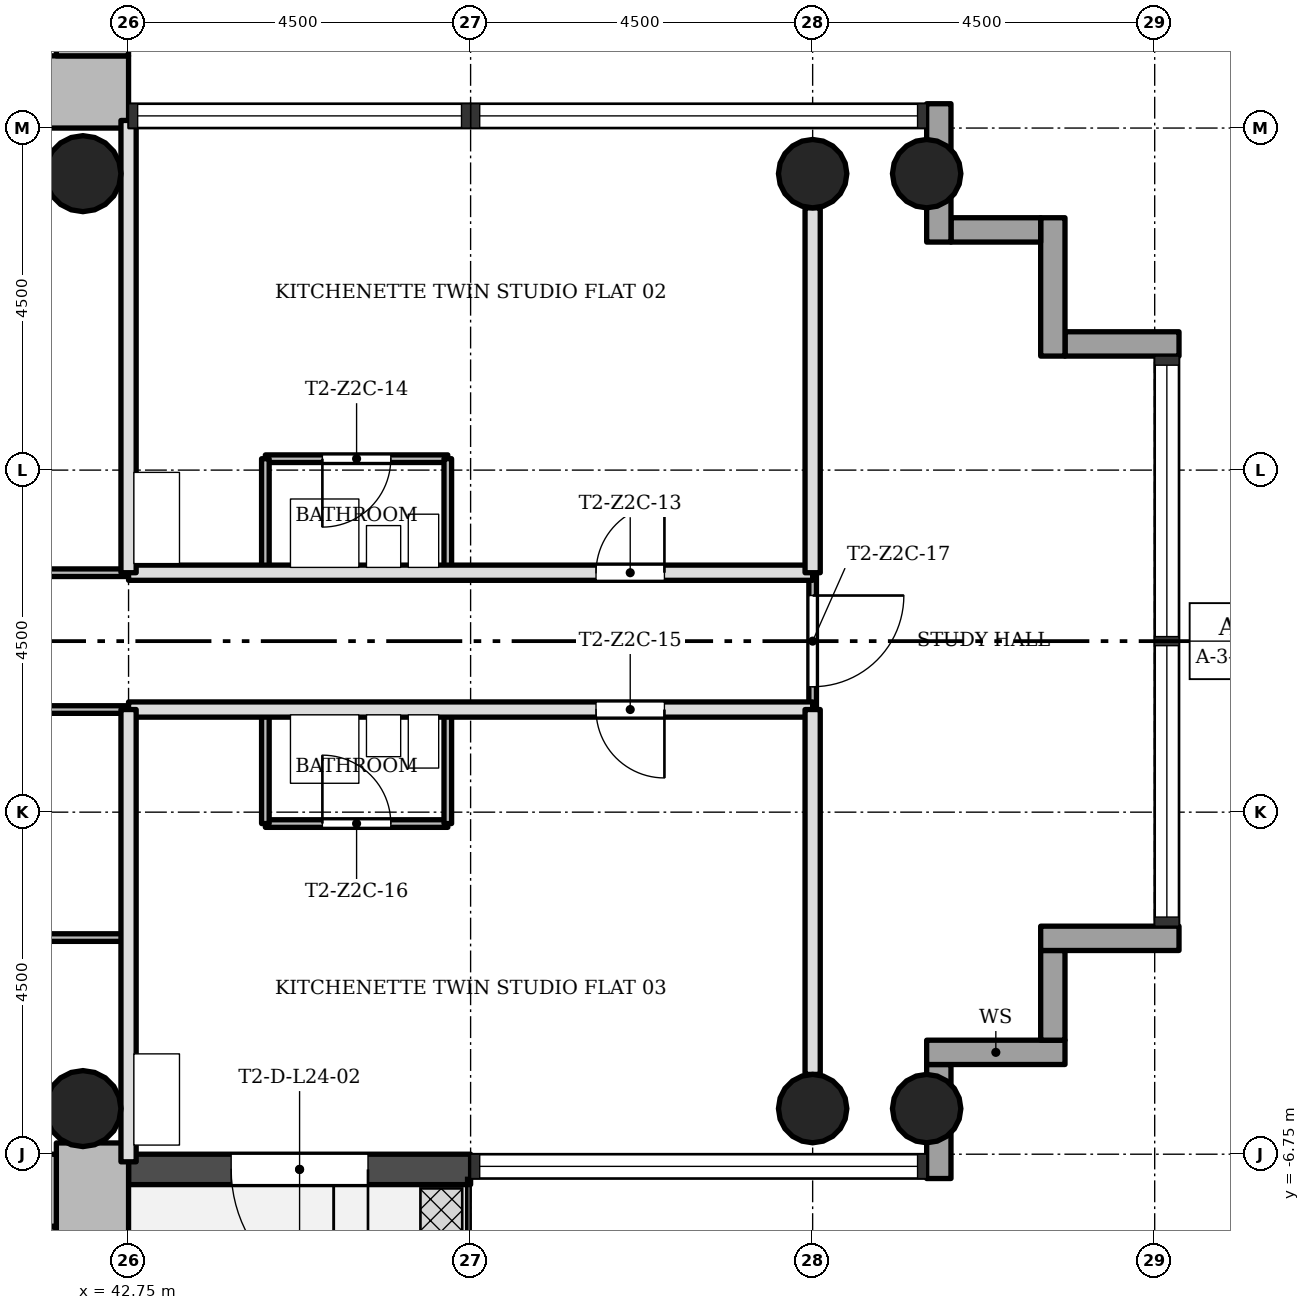
"""IFC4 building model, lengths in metres.
Left out: names, types, materials, properties, quantities, classifications, styles, units other than length and angle.
Written with IfcOpenShell. Run it as: python <this file> out.ifc"""

import sys

from ifc_helpers import new_model, si_unit, direction, frame, frame_2d, origin, origin_2d, place, context, subcontext, project, spatial, rectangle, hollow_circle, extrude, element, fill, save


model = new_model("IFC4")
c1 = context("Model", 3, precision=1e-05, world=origin(), true_north=direction((0.0, 1.0)))
c2 = subcontext(c1, "Body", "Model", "MODEL_VIEW")
j1 = project(units=[si_unit("LENGTHUNIT", "METRE"), si_unit("PLANEANGLEUNIT", "RADIAN")], contexts=[c1])
p1 = place(None, origin())
s1 = spatial("IfcSite", under=j1, at=p1, CompositionType="ELEMENT")
p2 = place(p1, origin())
s2 = spatial("IfcBuilding", under=s1, at=p2, CompositionType="ELEMENT")
p3 = place(p2, frame((0.0, 0.0, 90.2)))
s3 = spatial("IfcBuildingStorey", under=s2, at=p3, CompositionType="ELEMENT", Elevation=90.2)
p4 = place(p3, frame((30.2, 7.225, 0.0), z_axis=(0.0, 0.0, 1.0), x_axis=(1.0, 0.0, 0.0)))
e1 = element("IfcWall", 1, at=p4, inside=s3, PredefinedType="SHEAR", context=c2, shape_type="SweptSolid", body=[
    extrude(rectangle(XDim=12.55, YDim=0.95, at=frame_2d((6.275, 0.0))), origin(), (0.0, 0.0, 1.0), 3.4),
])
p5 = place(p4, frame((4.9, 0.0, 0.0)))
e2 = element("IfcOpeningElement", 2, at=p5, cuts=e1, PredefinedType="OPENING", context=c2, shape_type="SweptSolid", body=[
    extrude(rectangle(XDim=1.8, YDim=2.1, at=frame_2d((0.9, 1.05))), frame((0.0, 0.485, 0.0), z_axis=(0.0, -1.0, 0.0), x_axis=(1.0, 0.0, 0.0)), (0.0, 0.0, 1.0), 0.97),
])
p6 = place(p3, frame((42.275, 7.7, 0.0), z_axis=(0.0, 0.0, 1.0), x_axis=(0.0, 1.0, 0.0)))
e3 = element("IfcWall", 3, at=p6, inside=s3, PredefinedType="SHEAR", context=c2, shape_type="SweptSolid", body=[
    extrude(rectangle(XDim=8.05, YDim=0.95, at=frame_2d((4.025, 0.0))), origin(), (0.0, 0.0, 1.0), 3.4),
])
p7 = place(p3, frame((42.275, -14.8, 0.0), z_axis=(0.0, 0.0, 1.0), x_axis=(0.0, 1.0, 0.0)))
e4 = element("IfcWall", 4, at=p7, inside=s3, PredefinedType="SHEAR", context=c2, shape_type="SweptSolid", body=[
    extrude(rectangle(XDim=8.198, YDim=0.95, at=frame_2d((4.099, 0.0))), origin(), (0.0, 0.0, 1.0), 3.4),
])
p8 = place(p3, frame((41.8, -7.225, 0.0), z_axis=(0.0, 0.0, 1.0), x_axis=(-1.0, 0.0, 0.0)))
e5 = element("IfcWall", 5, at=p8, inside=s3, PredefinedType="SHEAR", context=c2, shape_type="SweptSolid", body=[
    extrude(rectangle(XDim=12.55, YDim=0.95, at=frame_2d((6.275, 0.0))), origin(), (0.0, 0.0, 1.0), 3.4),
])
p9 = place(p8, frame((4.9, 0.0, 0.0)))
e6 = element("IfcOpeningElement", 6, at=p9, cuts=e5, PredefinedType="OPENING", context=c2, shape_type="SweptSolid", body=[
    extrude(rectangle(XDim=1.8, YDim=2.1, at=frame_2d((0.9, 1.05))), frame((0.0, 0.485, 0.0), z_axis=(0.0, -1.0, 0.0), x_axis=(1.0, 0.0, 0.0)), (0.0, 0.0, 1.0), 0.97),
])
for number, where, z_axis, x_axis in (
    (7, (51.75, -6.15, 0.0), (0.0, 0.0, 1.0), (1.0, 0.0, 0.0)),
    (8, (51.75, 6.15, 0.0), (0.0, 0.0, 1.0), (1.0, 0.0, 0.0)),
    (9, (53.25, -6.15, 0.0), (0.0, 0.0, 1.0), (1.0, 0.0, 0.0)),
    (10, (53.25, 6.15, 0.0), (0.0, 0.0, 1.0), (1.0, 0.0, 0.0)),
):
    element("IfcColumn", number, at=place(p3, frame(where, z_axis=z_axis, x_axis=x_axis)), inside=s3, PredefinedType="COLUMN", context=c2, shape_type="SweptSolid", body=[
        extrude(hollow_circle(Radius=0.45, WallThickness=0.032, at=origin_2d()), origin(), (0.0, 0.0, 1.0), 3.4),
    ])
for number, where, z_axis, x_axis in (
    (11, (42.15, -6.15, 0.0), (0.0, 0.0, 1.0), (1.0, 0.0, 0.0)),
    (12, (42.15, 6.15, 0.0), (0.0, 0.0, 1.0), (1.0, 0.0, 0.0)),
):
    element("IfcColumn", number, at=place(p3, frame(where, z_axis=z_axis, x_axis=x_axis)), inside=s3, PredefinedType="COLUMN", context=c2, shape_type="SweptSolid", body=[
        extrude(hollow_circle(Radius=0.5, WallThickness=0.036, at=origin_2d()), origin(), (0.0, 0.0, 1.0), 3.4),
    ])
p10 = place(p3, frame((42.75, -6.95, -0.02), z_axis=(0.0, 0.0, 1.0), x_axis=(1.0, 0.0, 0.0)))
e13 = element("IfcWall", 13, at=p10, inside=s3, PredefinedType="STANDARD", context=c2, shape_type="SweptSolid", body=[
    extrude(rectangle(XDim=4.5, YDim=0.4, at=frame_2d((2.25, 0.0))), origin(), (0.0, 0.0, 1.0), 3.12),
])
p11 = place(p10, frame((1.35, 0.0, 0.02)))
e14 = element("IfcOpeningElement", 14, at=p11, cuts=e13, PredefinedType="OPENING", context=c2, shape_type="SweptSolid", body=[
    extrude(rectangle(XDim=1.8, YDim=2.1, at=frame_2d((0.9, 1.05))), frame((0.0, 0.21, 0.0), z_axis=(0.0, -1.0, 0.0), x_axis=(1.0, 0.0, 0.0)), (0.0, 0.0, 1.0), 0.42),
])
p12 = place(p3, frame((53.41, -7.07, -0.3), z_axis=(0.0, 0.0, 1.0), x_axis=(0.0, 1.0, 0.0)))
e15 = element("IfcWall", 15, at=p12, inside=s3, PredefinedType="STANDARD", context=c2, shape_type="SweptSolid", body=[
    extrude(rectangle(XDim=1.5, YDim=0.32, at=frame_2d((0.75, 0.0))), origin(), (0.0, 0.0, 1.0), 3.4),
])
p13 = place(p3, frame((53.25, -5.41, -0.3), z_axis=(0.0, 0.0, 1.0), x_axis=(1.0, 0.0, 0.0)))
e16 = element("IfcWall", 16, at=p13, inside=s3, PredefinedType="STANDARD", context=c2, shape_type="SweptSolid", body=[
    extrude(rectangle(XDim=1.82, YDim=0.32, at=frame_2d((0.91, 0.0))), origin(), (0.0, 0.0, 1.0), 3.4),
])
p14 = place(p3, frame((54.91, -5.25, -0.3), z_axis=(0.0, 0.0, 1.0), x_axis=(0.0, 1.0, 0.0)))
e17 = element("IfcWall", 17, at=p14, inside=s3, PredefinedType="STANDARD", context=c2, shape_type="SweptSolid", body=[
    extrude(rectangle(XDim=1.18, YDim=0.32, at=frame_2d((0.59, 0.0))), origin(), (0.0, 0.0, 1.0), 3.4),
])
p15 = place(p3, frame((54.75, -3.91, -0.3), z_axis=(0.0, 0.0, 1.0), x_axis=(1.0, 0.0, 0.0)))
e18 = element("IfcWall", 18, at=p15, inside=s3, PredefinedType="STANDARD", context=c2, shape_type="SweptSolid", body=[
    extrude(rectangle(XDim=1.82, YDim=0.32, at=frame_2d((0.91, 0.0))), origin(), (0.0, 0.0, 1.0), 3.4),
])
p16 = place(p3, frame((56.57, 3.91, -0.3), z_axis=(0.0, 0.0, 1.0), x_axis=(-1.0, 0.0, 0.0)))
e19 = element("IfcWall", 19, at=p16, inside=s3, PredefinedType="STANDARD", context=c2, shape_type="SweptSolid", body=[
    extrude(rectangle(XDim=1.5, YDim=0.32, at=frame_2d((0.75, 0.0))), origin(), (0.0, 0.0, 1.0), 3.4),
])
p17 = place(p3, frame((54.91, 3.75, -0.3), z_axis=(0.0, 0.0, 1.0), x_axis=(0.0, 1.0, 0.0)))
e20 = element("IfcWall", 20, at=p17, inside=s3, PredefinedType="STANDARD", context=c2, shape_type="SweptSolid", body=[
    extrude(rectangle(XDim=1.82, YDim=0.32, at=frame_2d((0.91, 0.0))), origin(), (0.0, 0.0, 1.0), 3.4),
])
p18 = place(p3, frame((54.75, 5.41, -0.3), z_axis=(0.0, 0.0, 1.0), x_axis=(-1.0, 0.0, 0.0)))
e21 = element("IfcWall", 21, at=p18, inside=s3, PredefinedType="STANDARD", context=c2, shape_type="SweptSolid", body=[
    extrude(rectangle(XDim=1.18, YDim=0.32, at=frame_2d((0.59, 0.0))), origin(), (0.0, 0.0, 1.0), 3.4),
])
p19 = place(p3, frame((53.41, 5.25, -0.3), z_axis=(0.0, 0.0, 1.0), x_axis=(0.0, 1.0, 0.0)))
e22 = element("IfcWall", 22, at=p19, inside=s3, PredefinedType="STANDARD", context=c2, shape_type="SweptSolid", body=[
    extrude(rectangle(XDim=1.82, YDim=0.32, at=frame_2d((0.91, 0.0))), origin(), (0.0, 0.0, 1.0), 3.4),
])
p20 = place(p3, frame((42.75, -3.9, 0.0), z_axis=(0.0, 0.0, 1.0), x_axis=(-1.0, 0.0, 0.0)))
e23 = element("IfcWall", 23, at=p20, inside=s3, PredefinedType="PARTITIONING", context=c2, shape_type="SweptSolid", body=[
    extrude(rectangle(XDim=5.25, YDim=0.1, at=frame_2d((2.625, 0.0))), origin(), (0.0, 0.0, 1.0), 3.0),
])
p21 = place(p3, frame((46.95, -2.4, 0.0), z_axis=(0.0, 0.0, 1.0), x_axis=(-1.0, 0.0, 0.0)))
e24 = element("IfcWall", 24, at=p21, inside=s3, PredefinedType="PARTITIONING", context=c2, shape_type="SweptSolid", body=[
    extrude(rectangle(XDim=2.4, YDim=0.1, at=frame_2d((1.2, 0.0))), origin(), (0.0, 0.0, 1.0), 3.0),
])
p22 = place(p21, frame((0.75, 0.0, 0.0)))
e25 = element("IfcOpeningElement", 25, at=p22, cuts=e24, PredefinedType="OPENING", context=c2, shape_type="SweptSolid", body=[
    extrude(rectangle(XDim=0.9, YDim=2.1, at=frame_2d((0.45, 1.05))), frame((0.0, 0.06, 0.0), z_axis=(0.0, -1.0, 0.0), x_axis=(1.0, 0.0, 0.0)), (0.0, 0.0, 1.0), 0.12),
])
p23 = place(p3, frame((42.75, -0.9, 0.0), z_axis=(0.0, 0.0, 1.0), x_axis=(-1.0, 0.0, 0.0)))
e26 = element("IfcWall", 26, at=p23, inside=s3, PredefinedType="PARTITIONING", context=c2, shape_type="SweptSolid", body=[
    extrude(rectangle(XDim=5.25, YDim=0.1, at=frame_2d((2.625, 0.0))), origin(), (0.0, 0.0, 1.0), 3.0),
])
p24 = place(p23, frame((2.175, 0.0, 0.0)))
e27 = element("IfcOpeningElement", 27, at=p24, cuts=e26, PredefinedType="OPENING", context=c2, shape_type="SweptSolid", body=[
    extrude(rectangle(XDim=0.9, YDim=2.1, at=frame_2d((0.45, 1.05))), frame((0.0, 0.06, 0.0), z_axis=(0.0, -1.0, 0.0), x_axis=(1.0, 0.0, 0.0)), (0.0, 0.0, 1.0), 0.12),
])
p25 = place(p3, frame((51.75, -0.9, 0.0), z_axis=(0.0, 0.0, 1.0), x_axis=(-1.0, 0.0, 0.0)))
e28 = element("IfcWall", 28, at=p25, inside=s3, PredefinedType="SOLIDWALL", context=c2, shape_type="SweptSolid", body=[
    extrude(rectangle(XDim=9.0, YDim=0.2, at=frame_2d((4.5, 0.0))), origin(), (0.0, 0.0, 1.0), 3.0),
])
p26 = place(p25, frame((1.95, 0.0, 0.0)))
e29 = element("IfcOpeningElement", 29, at=p26, cuts=e28, PredefinedType="OPENING", context=c2, shape_type="SweptSolid", body=[
    extrude(rectangle(XDim=0.9, YDim=2.1, at=frame_2d((0.45, 1.05))), frame((0.0, 0.11, 0.0), z_axis=(0.0, -1.0, 0.0), x_axis=(1.0, 0.0, 0.0)), (0.0, 0.0, 1.0), 0.22),
])
p27 = place(p3, frame((42.75, 0.9, 0.0), z_axis=(0.0, 0.0, 1.0), x_axis=(-1.0, 0.0, 0.0)))
e30 = element("IfcWall", 30, at=p27, inside=s3, PredefinedType="PARTITIONING", context=c2, shape_type="SweptSolid", body=[
    extrude(rectangle(XDim=5.25, YDim=0.1, at=frame_2d((2.625, 0.0))), origin(), (0.0, 0.0, 1.0), 3.0),
])
p28 = place(p27, frame((3.6, 0.0, 0.0)))
e31 = element("IfcOpeningElement", 31, at=p28, cuts=e30, PredefinedType="OPENING", context=c2, shape_type="SweptSolid", body=[
    extrude(rectangle(XDim=0.9, YDim=2.1, at=frame_2d((0.45, 1.05))), frame((0.0, 0.06, 0.0), z_axis=(0.0, -1.0, 0.0), x_axis=(1.0, 0.0, 0.0)), (0.0, 0.0, 1.0), 0.12),
])
p29 = place(p3, frame((51.75, 0.9, 0.0), z_axis=(0.0, 0.0, 1.0), x_axis=(-1.0, 0.0, 0.0)))
e32 = element("IfcWall", 32, at=p29, inside=s3, PredefinedType="SOLIDWALL", context=c2, shape_type="SweptSolid", body=[
    extrude(rectangle(XDim=9.0, YDim=0.2, at=frame_2d((4.5, 0.0))), origin(), (0.0, 0.0, 1.0), 3.0),
])
p30 = place(p29, frame((1.95, 0.0, 0.0)))
e33 = element("IfcOpeningElement", 33, at=p30, cuts=e32, PredefinedType="OPENING", context=c2, shape_type="SweptSolid", body=[
    extrude(rectangle(XDim=0.9, YDim=2.1, at=frame_2d((0.45, 1.05))), frame((0.0, 0.11, 0.0), z_axis=(0.0, -1.0, 0.0), x_axis=(1.0, 0.0, 0.0)), (0.0, 0.0, 1.0), 0.22),
])
p31 = place(p3, frame((46.95, 2.4, 0.0), z_axis=(0.0, 0.0, 1.0), x_axis=(-1.0, 0.0, 0.0)))
e34 = element("IfcWall", 34, at=p31, inside=s3, PredefinedType="PARTITIONING", context=c2, shape_type="SweptSolid", body=[
    extrude(rectangle(XDim=2.4, YDim=0.1, at=frame_2d((1.2, 0.0))), origin(), (0.0, 0.0, 1.0), 3.0),
])
p32 = place(p31, frame((0.75, 0.0, 0.0)))
e35 = element("IfcOpeningElement", 35, at=p32, cuts=e34, PredefinedType="OPENING", context=c2, shape_type="SweptSolid", body=[
    extrude(rectangle(XDim=0.9, YDim=2.1, at=frame_2d((0.45, 1.05))), frame((0.0, 0.06, 0.0), z_axis=(0.0, -1.0, 0.0), x_axis=(1.0, 0.0, 0.0)), (0.0, 0.0, 1.0), 0.12),
])
p33 = place(p3, frame((51.75, -0.9, 0.0), z_axis=(0.0, 0.0, 1.0), x_axis=(0.0, 1.0, 0.0)))
e36 = element("IfcWall", 36, at=p33, inside=s3, PredefinedType="PARTITIONING", context=c2, shape_type="SweptSolid", body=[
    extrude(rectangle(XDim=1.8, YDim=0.1, at=frame_2d((0.9, 0.0))), origin(), (0.0, 0.0, 1.0), 3.0),
])
p34 = place(p33, frame((0.3, 0.0, 0.0)))
e37 = element("IfcOpeningElement", 37, at=p34, cuts=e36, PredefinedType="OPENING", context=c2, shape_type="SweptSolid", body=[
    extrude(rectangle(XDim=1.2, YDim=2.1, at=frame_2d((0.6, 1.05))), frame((0.0, 0.06, 0.0), z_axis=(0.0, -1.0, 0.0), x_axis=(1.0, 0.0, 0.0)), (0.0, 0.0, 1.0), 0.12),
])
for number, where, z_axis, x_axis in (
    (38, (51.75, -5.7, 0.0), (0.0, 0.0, 1.0), (0.0, 1.0, 0.0)),
    (39, (51.75, 0.9, 0.0), (0.0, 0.0, 1.0), (0.0, 1.0, 0.0)),
):
    element("IfcWall", number, at=place(p3, frame(where, z_axis=z_axis, x_axis=x_axis)), inside=s3, PredefinedType="SOLIDWALL", context=c2, shape_type="SweptSolid", body=[
        extrude(rectangle(XDim=4.8, YDim=0.2, at=frame_2d((2.4, 0.0))), origin(), (0.0, 0.0, 1.0), 3.0),
    ])
for number, where, z_axis, x_axis in (
    (40, (46.95, -2.4, 0.0), (0.0, 0.0, 1.0), (0.0, 1.0, 0.0)),
    (41, (46.95, 0.9, 0.0), (0.0, 0.0, 1.0), (0.0, 1.0, 0.0)),
    (42, (44.55, -2.4, 0.0), (0.0, 0.0, 1.0), (0.0, 1.0, 0.0)),
    (43, (44.55, 0.9, 0.0), (0.0, 0.0, 1.0), (0.0, 1.0, 0.0)),
):
    element("IfcWall", number, at=place(p3, frame(where, z_axis=z_axis, x_axis=x_axis)), inside=s3, PredefinedType="PARTITIONING", context=c2, shape_type="SweptSolid", body=[
        extrude(rectangle(XDim=1.5, YDim=0.1, at=frame_2d((0.75, 0.0))), origin(), (0.0, 0.0, 1.0), 3.0),
    ])
for number, where, z_axis, x_axis in (
    (44, (42.75, -6.85, 0.0), (0.0, 0.0, 1.0), (0.0, 1.0, 0.0)),
    (45, (42.75, 0.9, 0.0), (0.0, 0.0, 1.0), (0.0, 1.0, 0.0)),
):
    element("IfcWall", number, at=place(p3, frame(where, z_axis=z_axis, x_axis=x_axis)), inside=s3, PredefinedType="SOLIDWALL", context=c2, shape_type="SweptSolid", body=[
        extrude(rectangle(XDim=5.95, YDim=0.2, at=frame_2d((2.975, 0.0))), origin(), (0.0, 0.0, 1.0), 3.0),
    ])
p35 = place(p3, frame((37.9, -7.825, 0.0), z_axis=(0.0, 0.0, 1.0), x_axis=(1.0, 0.0, 0.0)))
e46 = element("IfcWall", 46, at=p35, inside=s3, PredefinedType="SHEAR", context=c2, shape_type="SweptSolid", body=[
    extrude(rectangle(XDim=3.9, YDim=0.25, at=frame_2d((1.95, 0.0))), origin(), (0.0, 0.0, 1.0), 3.4),
])
p36 = place(p11, origin())
e47 = element("IfcDoor", 47, at=p36, inside=s3, OperationType="SINGLE_SWING_RIGHT", PredefinedType="DOOR", context=c2, shape_type="SweptSolid", body=[
    extrude(rectangle(XDim=1.8, YDim=2.1, at=frame_2d((0.9, 1.05))), frame((0.0, 0.025, 0.0), z_axis=(0.0, -1.0, 0.0), x_axis=(1.0, 0.0, 0.0)), (0.0, 0.0, 1.0), 0.05),
])
fill(e14, e47)
p37 = place(p30, origin())
e48 = element("IfcDoor", 48, at=p37, inside=s3, OperationType="SINGLE_SWING_LEFT", PredefinedType="DOOR", context=c2, shape_type="SweptSolid", body=[
    extrude(rectangle(XDim=0.9, YDim=2.1, at=frame_2d((0.45, 1.05))), frame((0.0, 0.025, 0.0), z_axis=(0.0, -1.0, 0.0), x_axis=(1.0, 0.0, 0.0)), (0.0, 0.0, 1.0), 0.05),
])
fill(e33, e48)
p38 = place(p32, origin())
e49 = element("IfcDoor", 49, at=p38, inside=s3, OperationType="SINGLE_SWING_LEFT", PredefinedType="DOOR", context=c2, shape_type="SweptSolid", body=[
    extrude(rectangle(XDim=0.9, YDim=2.1, at=frame_2d((0.45, 1.05))), frame((0.0, 0.025, 0.0), z_axis=(0.0, -1.0, 0.0), x_axis=(1.0, 0.0, 0.0)), (0.0, 0.0, 1.0), 0.05),
])
fill(e35, e49)
p39 = place(p26, origin())
e50 = element("IfcDoor", 50, at=p39, inside=s3, OperationType="SINGLE_SWING_RIGHT", PredefinedType="DOOR", context=c2, shape_type="SweptSolid", body=[
    extrude(rectangle(XDim=0.9, YDim=2.1, at=frame_2d((0.45, 1.05))), frame((0.0, 0.025, 0.0), z_axis=(0.0, -1.0, 0.0), x_axis=(1.0, 0.0, 0.0)), (0.0, 0.0, 1.0), 0.05),
])
fill(e29, e50)
p40 = place(p22, origin())
e51 = element("IfcDoor", 51, at=p40, inside=s3, OperationType="SINGLE_SWING_RIGHT", PredefinedType="DOOR", context=c2, shape_type="SweptSolid", body=[
    extrude(rectangle(XDim=0.9, YDim=2.1, at=frame_2d((0.45, 1.05))), frame((0.0, 0.025, 0.0), z_axis=(0.0, -1.0, 0.0), x_axis=(1.0, 0.0, 0.0)), (0.0, 0.0, 1.0), 0.05),
])
fill(e25, e51)
p41 = place(p34, origin())
e52 = element("IfcDoor", 52, at=p41, inside=s3, OperationType="SINGLE_SWING_RIGHT", PredefinedType="DOOR", context=c2, shape_type="SweptSolid", body=[
    extrude(rectangle(XDim=1.2, YDim=2.1, at=frame_2d((0.6, 1.05))), frame((0.0, 0.025, 0.0), z_axis=(0.0, -1.0, 0.0), x_axis=(1.0, 0.0, 0.0)), (0.0, 0.0, 1.0), 0.05),
])
fill(e37, e52)
save(model, sys.argv[1])
